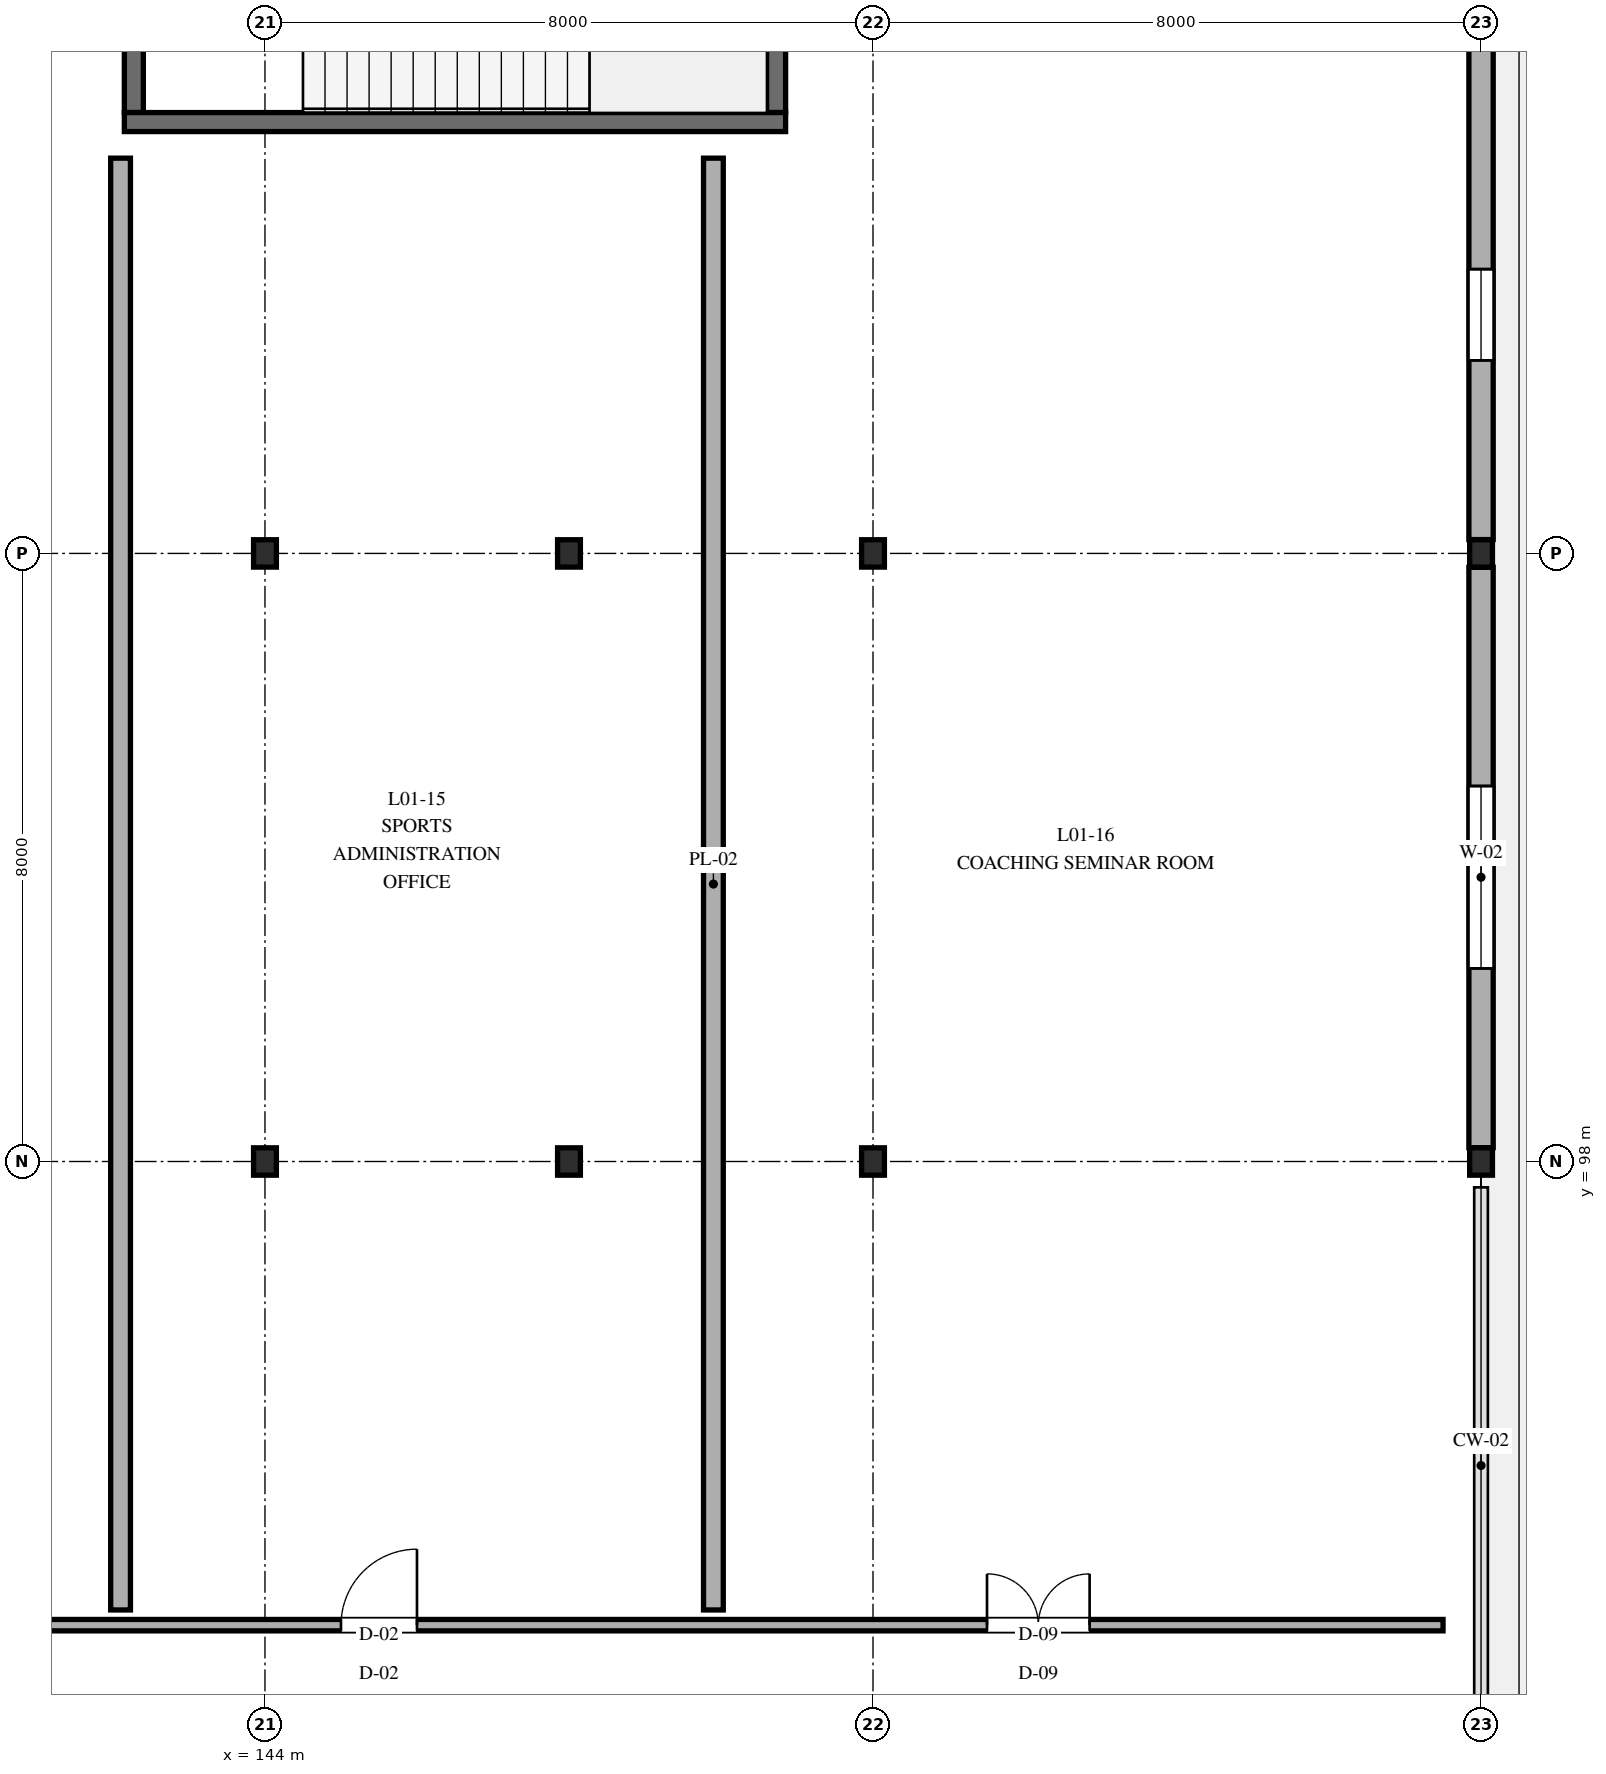
"""IFC4 building model, lengths in metres.
Left out: names, types, materials, properties, quantities, classifications, styles, units other than length and angle.
Written with IfcOpenShell. Run it as: python <this file> out.ifc"""

import sys

from ifc_helpers import new_model, si_unit, direction, frame, frame_2d, origin, origin_2d, place, context, subcontext, project, spatial, rectangle, i_section, extrude, element, fill, save


model = new_model("IFC4")
c1 = context("Model", 3, precision=1e-05, world=origin(), true_north=direction((0.0, 1.0)))
c2 = subcontext(c1, "Body", "Model", "MODEL_VIEW")
j1 = project(units=[si_unit("LENGTHUNIT", "METRE"), si_unit("PLANEANGLEUNIT", "RADIAN")], contexts=[c1])
p1 = place(None, origin())
s1 = spatial("IfcSite", under=j1, at=p1, CompositionType="ELEMENT")
p2 = place(p1, origin())
s2 = spatial("IfcBuilding", under=s1, at=p2, CompositionType="ELEMENT")
p3 = place(p2, frame((0.0, 0.0, 4.8)))
s3 = spatial("IfcBuildingStorey", under=s2, at=p3, CompositionType="ELEMENT", Elevation=4.8)
for number, where, z_axis, x_axis in (
    (1, (144.0, 98.0, 0.0), (0.0, 0.0, 1.0), (1.0, 0.0, 0.0)),
    (2, (144.0, 106.0, 0.0), (0.0, 0.0, 1.0), (1.0, 0.0, 0.0)),
    (3, (148.0, 98.0, 0.0), (0.0, 0.0, 1.0), (1.0, 0.0, 0.0)),
    (4, (148.0, 106.0, 0.0), (0.0, 0.0, 1.0), (1.0, 0.0, 0.0)),
    (5, (152.0, 98.0, 0.0), (0.0, 0.0, 1.0), (1.0, 0.0, 0.0)),
    (6, (152.0, 106.0, 0.0), (0.0, 0.0, 1.0), (1.0, 0.0, 0.0)),
    (7, (160.0, 98.0, 0.0), (0.0, 0.0, 1.0), (1.0, 0.0, 0.0)),
    (8, (160.0, 106.0, 0.0), (0.0, 0.0, 1.0), (1.0, 0.0, 0.0)),
):
    element("IfcColumn", number, at=place(p3, frame(where, z_axis=z_axis, x_axis=x_axis)), inside=s3, PredefinedType="COLUMN", context=c2, shape_type="SweptSolid", body=[
        extrude(i_section(OverallWidth=0.3, OverallDepth=0.36, WebThickness=0.012, FlangeThickness=0.022, FilletRadius=0.027, at=origin_2d()), origin(), (0.0, 0.0, 1.0), 4.8),
    ])
p4 = place(p3, frame((160.0, 98.182, 0.0), z_axis=(0.0, 0.0, 1.0), x_axis=(0.0, 1.0, 0.0)))
e9 = element("IfcWall", 9, at=p4, inside=s3, PredefinedType="STANDARD", context=c2, shape_type="SweptSolid", body=[
    extrude(rectangle(XDim=7.636, YDim=0.32, at=frame_2d((3.818, 0.0))), origin(), (0.0, 0.0, 1.0), 4.25),
])
p5 = place(p4, frame((2.358, 0.0, 0.95)))
e10 = element("IfcOpeningElement", 10, at=p5, cuts=e9, PredefinedType="OPENING", context=c2, shape_type="SweptSolid", body=[
    extrude(rectangle(XDim=2.4, YDim=1.6, at=frame_2d((1.2, 0.8))), frame((0.0, 0.17, 0.0), z_axis=(0.0, -1.0, 0.0), x_axis=(1.0, 0.0, 0.0)), (0.0, 0.0, 1.0), 0.34),
])
p6 = place(p3, frame((160.0, 106.182, 0.0), z_axis=(0.0, 0.0, 1.0), x_axis=(0.0, 1.0, 0.0)))
e11 = element("IfcWall", 11, at=p6, inside=s3, PredefinedType="STANDARD", context=c2, shape_type="SweptSolid", body=[
    extrude(rectangle(XDim=10.636, YDim=0.32, at=frame_2d((5.318, 0.0))), origin(), (0.0, 0.0, 1.0), 4.25),
])
p7 = place(p6, frame((2.358, 0.0, 0.95)))
e12 = element("IfcOpeningElement", 12, at=p7, cuts=e11, PredefinedType="OPENING", context=c2, shape_type="SweptSolid", body=[
    extrude(rectangle(XDim=1.2, YDim=1.5, at=frame_2d((0.6, 0.75))), frame((0.0, 0.17, 0.0), z_axis=(0.0, -1.0, 0.0), x_axis=(1.0, 0.0, 0.0)), (0.0, 0.0, 1.0), 0.34),
])
p8 = place(p3, frame((142.275, 111.8, 0.0), z_axis=(0.0, 0.0, 1.0), x_axis=(0.0, 1.0, 0.0)))
e13 = element("IfcWall", 13, at=p8, inside=s3, PredefinedType="SHEAR", context=c2, shape_type="SweptSolid", body=[
    extrude(rectangle(XDim=4.18, YDim=0.25, at=frame_2d((2.09, 0.0))), origin(), (0.0, 0.0, 1.0), 4.8),
])
p9 = place(p8, frame((1.365, 0.0, 0.0)))
e14 = element("IfcOpeningElement", 14, at=p9, cuts=e13, PredefinedType="OPENING", context=c2, shape_type="SweptSolid", body=[
    extrude(rectangle(XDim=1.45, YDim=2.2, at=frame_2d((0.725, 1.1))), frame((0.0, 0.135, 0.0), z_axis=(0.0, -1.0, 0.0), x_axis=(1.0, 0.0, 0.0)), (0.0, 0.0, 1.0), 0.27),
])
p10 = place(p3, frame((150.725, 115.98, 0.0), z_axis=(0.0, 0.0, 1.0), x_axis=(0.0, -1.0, 0.0)))
e15 = element("IfcWall", 15, at=p10, inside=s3, PredefinedType="SHEAR", context=c2, shape_type="SweptSolid", body=[
    extrude(rectangle(XDim=4.18, YDim=0.25, at=frame_2d((2.09, 0.0))), origin(), (0.0, 0.0, 1.0), 4.8),
])
p11 = place(p3, frame((142.15, 111.675, 0.0), z_axis=(0.0, 0.0, 1.0), x_axis=(1.0, 0.0, 0.0)))
e16 = element("IfcWall", 16, at=p11, inside=s3, PredefinedType="SHEAR", context=c2, shape_type="SweptSolid", body=[
    extrude(rectangle(XDim=8.7, YDim=0.25, at=frame_2d((4.35, 0.0))), origin(), (0.0, 0.0, 1.0), 4.8),
])
p12 = place(p3, frame((104.5, 91.9, 0.0), z_axis=(0.0, 0.0, 1.0), x_axis=(1.0, 0.0, 0.0)))
e17 = element("IfcWall", 17, at=p12, inside=s3, PredefinedType="PARTITIONING", context=c2, shape_type="SweptSolid", body=[
    extrude(rectangle(XDim=55.0, YDim=0.15, at=frame_2d((27.5, 0.0))), origin(), (0.0, 0.0, 1.0), 3.95),
])
p13 = place(p12, frame((2.5, 0.0, 0.0)))
e18 = element("IfcOpeningElement", 18, at=p13, cuts=e17, PredefinedType="OPENING", context=c2, shape_type="SweptSolid", body=[
    extrude(rectangle(XDim=1.1, YDim=2.2, at=frame_2d((0.55, 1.1))), frame((0.0, 0.085, 0.0), z_axis=(0.0, -1.0, 0.0), x_axis=(1.0, 0.0, 0.0)), (0.0, 0.0, 1.0), 0.17),
])
p14 = place(p12, frame((11.2, 0.0, 0.0)))
e19 = element("IfcOpeningElement", 19, at=p14, cuts=e17, PredefinedType="OPENING", context=c2, shape_type="SweptSolid", body=[
    extrude(rectangle(XDim=1.05, YDim=2.15, at=frame_2d((0.525, 1.075))), frame((0.0, 0.085, 0.0), z_axis=(0.0, -1.0, 0.0), x_axis=(1.0, 0.0, 0.0)), (0.0, 0.0, 1.0), 0.17),
])
p15 = place(p12, frame((24.0, 0.0, 0.0)))
e20 = element("IfcOpeningElement", 20, at=p15, cuts=e17, PredefinedType="OPENING", context=c2, shape_type="SweptSolid", body=[
    extrude(rectangle(XDim=1.1, YDim=2.2, at=frame_2d((0.55, 1.1))), frame((0.0, 0.085, 0.0), z_axis=(0.0, -1.0, 0.0), x_axis=(1.0, 0.0, 0.0)), (0.0, 0.0, 1.0), 0.17),
])
p16 = place(p12, frame((40.5, 0.0, 0.0)))
e21 = element("IfcOpeningElement", 21, at=p16, cuts=e17, PredefinedType="OPENING", context=c2, shape_type="SweptSolid", body=[
    extrude(rectangle(XDim=1.0, YDim=2.15, at=frame_2d((0.5, 1.075))), frame((0.0, 0.085, 0.0), z_axis=(0.0, -1.0, 0.0), x_axis=(1.0, 0.0, 0.0)), (0.0, 0.0, 1.0), 0.17),
])
p17 = place(p12, frame((49.0, 0.0, 0.0)))
e22 = element("IfcOpeningElement", 22, at=p17, cuts=e17, PredefinedType="OPENING", context=c2, shape_type="SweptSolid", body=[
    extrude(rectangle(XDim=1.35, YDim=2.2, at=frame_2d((0.675, 1.1))), frame((0.0, 0.085, 0.0), z_axis=(0.0, -1.0, 0.0), x_axis=(1.0, 0.0, 0.0)), (0.0, 0.0, 1.0), 0.17),
])
for number, where, z_axis, x_axis in (
    (23, (142.1, 92.1, 0.0), (0.0, 0.0, 1.0), (0.0, 1.0, 0.0)),
    (24, (149.9, 92.1, 0.0), (0.0, 0.0, 1.0), (0.0, 1.0, 0.0)),
):
    element("IfcWall", number, at=place(p3, frame(where, z_axis=z_axis, x_axis=x_axis)), inside=s3, PredefinedType="PLUMBINGWALL", context=c2, shape_type="SweptSolid", body=[
        extrude(rectangle(XDim=19.1, YDim=0.26, at=frame_2d((9.55, 0.0))), origin(), (0.0, 0.0, 1.0), 3.95),
    ])
p18 = place(p5, origin())
e25 = element("IfcWindow", 25, at=p18, inside=s3, PartitioningType="SINGLE_PANEL", PredefinedType="WINDOW", context=c2, shape_type="SweptSolid", body=[
    extrude(rectangle(XDim=2.4, YDim=1.6, at=frame_2d((1.2, 0.8))), frame((0.0, 0.03, 0.0), z_axis=(0.0, -1.0, 0.0), x_axis=(1.0, 0.0, 0.0)), (0.0, 0.0, 1.0), 0.06),
])
fill(e10, e25)
p19 = place(p7, origin())
e26 = element("IfcWindow", 26, at=p19, inside=s3, PartitioningType="SINGLE_PANEL", PredefinedType="WINDOW", context=c2, shape_type="SweptSolid", body=[
    extrude(rectangle(XDim=1.2, YDim=1.5, at=frame_2d((0.6, 0.75))), frame((0.0, 0.03, 0.0), z_axis=(0.0, -1.0, 0.0), x_axis=(1.0, 0.0, 0.0)), (0.0, 0.0, 1.0), 0.06),
])
fill(e12, e26)
p20 = place(p16, origin())
e27 = element("IfcDoor", 27, at=p20, inside=s3, OperationType="SINGLE_SWING_RIGHT", PredefinedType="DOOR", context=c2, shape_type="SweptSolid", body=[
    extrude(rectangle(XDim=1.0, YDim=2.15, at=frame_2d((0.5, 1.075))), frame((0.0, 0.025, 0.0), z_axis=(0.0, -1.0, 0.0), x_axis=(1.0, 0.0, 0.0)), (0.0, 0.0, 1.0), 0.05),
])
fill(e21, e27)
p21 = place(p17, origin())
e28 = element("IfcDoor", 28, at=p21, inside=s3, OperationType="DOUBLE_DOOR_SINGLE_SWING", PredefinedType="DOOR", context=c2, shape_type="SweptSolid", body=[
    extrude(rectangle(XDim=1.35, YDim=2.2, at=frame_2d((0.675, 1.1))), frame((0.0, 0.025, 0.0), z_axis=(0.0, -1.0, 0.0), x_axis=(1.0, 0.0, 0.0)), (0.0, 0.0, 1.0), 0.05),
])
fill(e22, e28)
save(model, sys.argv[1])
